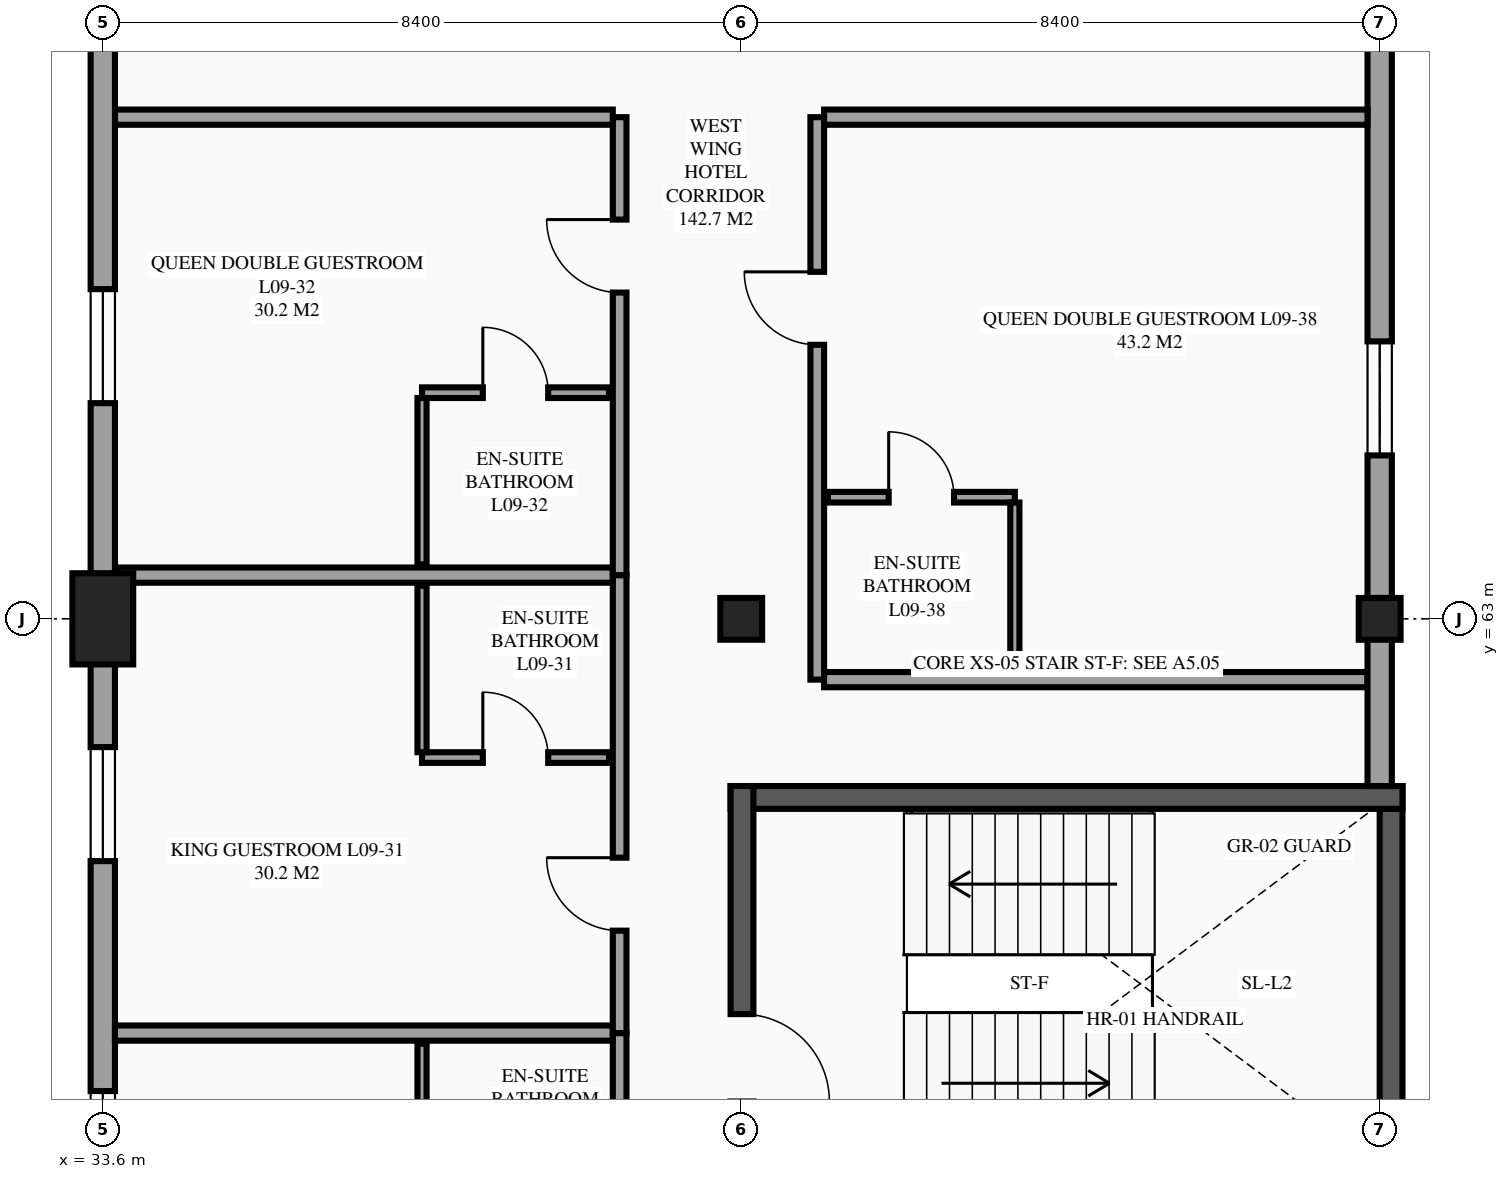
"""IFC4 building model, lengths in metres.
Left out: names, types, materials, properties, quantities, classifications, styles, units other than length and angle.
Written with IfcOpenShell. Run it as: python <this file> out.ifc"""

import sys

from ifc_helpers import new_model, si_unit, direction, frame, frame_2d, origin, origin_2d, place, context, subcontext, project, spatial, rectangle, extrude, element, fill, save


model = new_model("IFC4")
c1 = context("Model", 3, precision=1e-05, world=origin(), true_north=direction((0.0, 1.0)))
c2 = subcontext(c1, "Body", "Model", "MODEL_VIEW")
j1 = project(units=[si_unit("LENGTHUNIT", "METRE"), si_unit("PLANEANGLEUNIT", "RADIAN")], contexts=[c1])
p1 = place(None, origin())
s1 = spatial("IfcSite", under=j1, at=p1, CompositionType="ELEMENT")
p2 = place(p1, origin())
s2 = spatial("IfcBuilding", under=s1, at=p2, CompositionType="ELEMENT")
p3 = place(p2, frame((0.0, 0.0, 36.3)))
s3 = spatial("IfcBuildingStorey", under=s2, at=p3, CompositionType="ELEMENT", Elevation=36.3)
p4 = place(p3, frame((33.6, 63.0, 0.0), z_axis=(0.0, 0.0, 1.0), x_axis=(1.0, 0.0, 0.0)))
e1 = element("IfcColumn", 1, at=p4, inside=s3, PredefinedType="COLUMN", context=c2, shape_type="SweptSolid", body=[
    extrude(rectangle(XDim=0.8, YDim=1.2, at=origin_2d()), origin(), (0.0, 0.0, 1.0), 3.6),
])
for number, where, z_axis, x_axis in (
    (2, (42.0, 63.0, 0.0), (0.0, 0.0, 1.0), (1.0, 0.0, 0.0)),
    (3, (50.4, 63.0, 0.0), (0.0, 0.0, 1.0), (1.0, 0.0, 0.0)),
):
    element("IfcColumn", number, at=place(p3, frame(where, z_axis=z_axis, x_axis=x_axis)), inside=s3, PredefinedType="COLUMN", context=c2, shape_type="SweptSolid", body=[
        extrude(rectangle(XDim=0.55, YDim=0.55, at=origin_2d()), origin(), (0.0, 0.0, 1.0), 3.6),
    ])
p5 = place(p3, frame((50.4, 63.0, 0.0), z_axis=(0.0, 0.0, 1.0), x_axis=(0.0, 1.0, 0.0)))
e4 = element("IfcWall", 4, at=p5, inside=s3, PredefinedType="STANDARD", context=c2, shape_type="SweptSolid", body=[
    extrude(rectangle(XDim=8.4, YDim=0.32, at=frame_2d((4.2, 0.0))), origin(), (0.0, 0.0, 1.0), 3.126),
])
p6 = place(p5, frame((2.15, 0.0, 0.85)))
e5 = element("IfcOpeningElement", 5, at=p6, cuts=e4, PredefinedType="OPENING", context=c2, shape_type="SweptSolid", body=[
    extrude(rectangle(XDim=1.5, YDim=1.5, at=frame_2d((0.75, 0.75))), frame((0.0, 0.17, 0.0), z_axis=(0.0, -1.0, 0.0), x_axis=(1.0, 0.0, 0.0)), (0.0, 0.0, 1.0), 0.34),
])
p7 = place(p3, frame((33.6, 63.0, 0.0), z_axis=(0.0, 0.0, 1.0), x_axis=(0.0, -1.0, 0.0)))
e6 = element("IfcWall", 6, at=p7, inside=s3, PredefinedType="STANDARD", context=c2, shape_type="SweptSolid", body=[
    extrude(rectangle(XDim=25.2, YDim=0.32, at=frame_2d((12.6, 0.0))), origin(), (0.0, 0.0, 1.0), 2.63),
])
p8 = place(p7, frame((19.762, 0.0, 0.85)))
e7 = element("IfcOpeningElement", 7, at=p8, cuts=e6, PredefinedType="OPENING", context=c2, shape_type="SweptSolid", body=[
    extrude(rectangle(XDim=1.5, YDim=1.5, at=frame_2d((0.75, 0.75))), frame((0.0, 0.17, 0.0), z_axis=(0.0, -1.0, 0.0), x_axis=(1.0, 0.0, 0.0)), (0.0, 0.0, 1.0), 0.34),
])
p9 = place(p7, frame((13.738, 0.0, 0.85)))
e8 = element("IfcOpeningElement", 8, at=p9, cuts=e6, PredefinedType="OPENING", context=c2, shape_type="SweptSolid", body=[
    extrude(rectangle(XDim=1.5, YDim=1.5, at=frame_2d((0.75, 0.75))), frame((0.0, 0.17, 0.0), z_axis=(0.0, -1.0, 0.0), x_axis=(1.0, 0.0, 0.0)), (0.0, 0.0, 1.0), 0.34),
])
p10 = place(p7, frame((6.212, 0.0, 0.85)))
e9 = element("IfcOpeningElement", 9, at=p10, cuts=e6, PredefinedType="OPENING", context=c2, shape_type="SweptSolid", body=[
    extrude(rectangle(XDim=1.5, YDim=1.5, at=frame_2d((0.75, 0.75))), frame((0.0, 0.17, 0.0), z_axis=(0.0, -1.0, 0.0), x_axis=(1.0, 0.0, 0.0)), (0.0, 0.0, 1.0), 0.34),
])
p11 = place(p7, frame((1.688, 0.0, 0.85)))
e10 = element("IfcOpeningElement", 10, at=p11, cuts=e6, PredefinedType="OPENING", context=c2, shape_type="SweptSolid", body=[
    extrude(rectangle(XDim=1.5, YDim=1.5, at=frame_2d((0.75, 0.75))), frame((0.0, 0.17, 0.0), z_axis=(0.0, -1.0, 0.0), x_axis=(1.0, 0.0, 0.0)), (0.0, 0.0, 1.0), 0.34),
])
p12 = place(p3, frame((50.55, 55.6, 0.0), z_axis=(0.0, 0.0, 1.0), x_axis=(0.0, 1.0, 0.0)))
e11 = element("IfcWall", 11, at=p12, inside=s3, PredefinedType="SHEAR", context=c2, shape_type="SweptSolid", body=[
    extrude(rectangle(XDim=5.2, YDim=0.3, at=frame_2d((2.6, 0.0))), origin(), (0.0, 0.0, 1.0), 3.6),
])
p13 = place(p3, frame((50.7, 60.65, 0.0), z_axis=(0.0, 0.0, 1.0), x_axis=(-1.0, 0.0, 0.0)))
e12 = element("IfcWall", 12, at=p13, inside=s3, PredefinedType="SHEAR", context=c2, shape_type="SweptSolid", body=[
    extrude(rectangle(XDim=8.84, YDim=0.3, at=frame_2d((4.42, 0.0))), origin(), (0.0, 0.0, 1.0), 3.6),
])
p14 = place(p3, frame((42.01, 60.8, 0.0), z_axis=(0.0, 0.0, 1.0), x_axis=(0.0, -1.0, 0.0)))
e13 = element("IfcWall", 13, at=p14, inside=s3, PredefinedType="SHEAR", context=c2, shape_type="SweptSolid", body=[
    extrude(rectangle(XDim=5.2, YDim=0.3, at=frame_2d((2.6, 0.0))), origin(), (0.0, 0.0, 1.0), 3.6),
])
p15 = place(p14, frame((3.0, 0.0, 0.0)))
e14 = element("IfcOpeningElement", 14, at=p15, cuts=e13, PredefinedType="OPENING", context=c2, shape_type="SweptSolid", body=[
    extrude(rectangle(XDim=1.15, YDim=2.15, at=frame_2d((0.575, 1.075))), frame((0.0, 0.16, 0.0), z_axis=(0.0, -1.0, 0.0), x_axis=(1.0, 0.0, 0.0)), (0.0, 0.0, 1.0), 0.32),
])
p16 = place(p3, frame((40.4, 51.525, 0.0), z_axis=(0.0, 0.0, 1.0), x_axis=(0.0, 1.0, 0.0)))
e15 = element("IfcWall", 15, at=p16, inside=s3, PredefinedType="PARTITIONING", context=c2, shape_type="SweptSolid", body=[
    extrude(rectangle(XDim=6.025, YDim=0.18, at=frame_2d((3.013, 0.0))), origin(), (0.0, 0.0, 1.0), 3.375),
])
p17 = place(p16, frame((0.647, 0.0, 0.0)))
e16 = element("IfcOpeningElement", 16, at=p17, cuts=e15, PredefinedType="OPENING", context=c2, shape_type="SweptSolid", body=[
    extrude(rectangle(XDim=0.96, YDim=2.15, at=frame_2d((0.48, 1.075))), frame((0.0, 0.1, 0.0), z_axis=(0.0, -1.0, 0.0), x_axis=(1.0, 0.0, 0.0)), (0.0, 0.0, 1.0), 0.2),
])
p18 = place(p3, frame((33.76, 57.55, 0.0), z_axis=(0.0, 0.0, 1.0), x_axis=(1.0, 0.0, 0.0)))
e17 = element("IfcWall", 17, at=p18, inside=s3, PredefinedType="PARTITIONING", context=c2, shape_type="SweptSolid", body=[
    extrude(rectangle(XDim=6.55, YDim=0.2, at=frame_2d((3.275, 0.0))), origin(), (0.0, 0.0, 1.0), 3.375),
])
p19 = place(p3, frame((37.8, 55.22, 0.0), z_axis=(0.0, 0.0, 1.0), x_axis=(0.0, 1.0, 0.0)))
e18 = element("IfcWall", 18, at=p19, inside=s3, PredefinedType="PARTITIONING", context=c2, shape_type="SweptSolid", body=[
    extrude(rectangle(XDim=2.19, YDim=0.12, at=frame_2d((1.095, 0.0))), origin(), (0.0, 0.0, 1.0), 3.375),
])
p20 = place(p3, frame((40.4, 57.55, 0.0), z_axis=(0.0, 0.0, 1.0), x_axis=(0.0, 1.0, 0.0)))
e19 = element("IfcWall", 19, at=p20, inside=s3, PredefinedType="PARTITIONING", context=c2, shape_type="SweptSolid", body=[
    extrude(rectangle(XDim=6.025, YDim=0.18, at=frame_2d((3.012, 0.0))), origin(), (0.0, 0.0, 1.0), 3.375),
])
p21 = place(p20, frame((1.347, 0.0, 0.0)))
e20 = element("IfcOpeningElement", 20, at=p21, cuts=e19, PredefinedType="OPENING", context=c2, shape_type="SweptSolid", body=[
    extrude(rectangle(XDim=0.96, YDim=2.15, at=frame_2d((0.48, 1.075))), frame((0.0, 0.1, 0.0), z_axis=(0.0, -1.0, 0.0), x_axis=(1.0, 0.0, 0.0)), (0.0, 0.0, 1.0), 0.2),
])
p22 = place(p3, frame((33.76, 63.575, 0.0), z_axis=(0.0, 0.0, 1.0), x_axis=(1.0, 0.0, 0.0)))
e21 = element("IfcWall", 21, at=p22, inside=s3, PredefinedType="PARTITIONING", context=c2, shape_type="SweptSolid", body=[
    extrude(rectangle(XDim=6.55, YDim=0.2, at=frame_2d((3.275, 0.0))), origin(), (0.0, 0.0, 1.0), 3.375),
])
p23 = place(p3, frame((37.8, 61.175, 0.0), z_axis=(0.0, 0.0, 1.0), x_axis=(1.0, 0.0, 0.0)))
e22 = element("IfcWall", 22, at=p23, inside=s3, PredefinedType="PARTITIONING", context=c2, shape_type="SweptSolid", body=[
    extrude(rectangle(XDim=2.46, YDim=0.14, at=frame_2d((1.23, 0.0))), origin(), (0.0, 0.0, 1.0), 3.375),
])
p24 = place(p23, frame((0.8, 0.0, 0.0)))
e23 = element("IfcOpeningElement", 23, at=p24, cuts=e22, PredefinedType="OPENING", context=c2, shape_type="SweptSolid", body=[
    extrude(rectangle(XDim=0.86, YDim=2.1, at=frame_2d((0.43, 1.05))), frame((0.0, 0.08, 0.0), z_axis=(0.0, -1.0, 0.0), x_axis=(1.0, 0.0, 0.0)), (0.0, 0.0, 1.0), 0.16),
])
p25 = place(p3, frame((37.8, 61.245, 0.0), z_axis=(0.0, 0.0, 1.0), x_axis=(0.0, 1.0, 0.0)))
e24 = element("IfcWall", 24, at=p25, inside=s3, PredefinedType="PARTITIONING", context=c2, shape_type="SweptSolid", body=[
    extrude(rectangle(XDim=2.19, YDim=0.12, at=frame_2d((1.095, 0.0))), origin(), (0.0, 0.0, 1.0), 3.375),
])
p26 = place(p3, frame((40.4, 63.575, 0.0), z_axis=(0.0, 0.0, 1.0), x_axis=(0.0, 1.0, 0.0)))
e25 = element("IfcWall", 25, at=p26, inside=s3, PredefinedType="PARTITIONING", context=c2, shape_type="SweptSolid", body=[
    extrude(rectangle(XDim=6.025, YDim=0.18, at=frame_2d((3.013, 0.0))), origin(), (0.0, 0.0, 1.0), 3.375),
])
p27 = place(p26, frame((3.718, 0.0, 0.0)))
e26 = element("IfcOpeningElement", 26, at=p27, cuts=e25, PredefinedType="OPENING", context=c2, shape_type="SweptSolid", body=[
    extrude(rectangle(XDim=0.96, YDim=2.15, at=frame_2d((0.48, 1.075))), frame((0.0, 0.1, 0.0), z_axis=(0.0, -1.0, 0.0), x_axis=(1.0, 0.0, 0.0)), (0.0, 0.0, 1.0), 0.2),
])
p28 = place(p3, frame((33.76, 69.6, 0.0), z_axis=(0.0, 0.0, 1.0), x_axis=(1.0, 0.0, 0.0)))
e27 = element("IfcWall", 27, at=p28, inside=s3, PredefinedType="PARTITIONING", context=c2, shape_type="SweptSolid", body=[
    extrude(rectangle(XDim=6.55, YDim=0.2, at=frame_2d((3.275, 0.0))), origin(), (0.0, 0.0, 1.0), 3.375),
])
p29 = place(p3, frame((37.8, 65.975, 0.0), z_axis=(0.0, 0.0, 1.0), x_axis=(1.0, 0.0, 0.0)))
e28 = element("IfcWall", 28, at=p29, inside=s3, PredefinedType="PARTITIONING", context=c2, shape_type="SweptSolid", body=[
    extrude(rectangle(XDim=2.46, YDim=0.14, at=frame_2d((1.23, 0.0))), origin(), (0.0, 0.0, 1.0), 3.375),
])
p30 = place(p29, frame((0.8, 0.0, 0.0)))
e29 = element("IfcOpeningElement", 29, at=p30, cuts=e28, PredefinedType="OPENING", context=c2, shape_type="SweptSolid", body=[
    extrude(rectangle(XDim=0.86, YDim=2.1, at=frame_2d((0.43, 1.05))), frame((0.0, 0.08, 0.0), z_axis=(0.0, -1.0, 0.0), x_axis=(1.0, 0.0, 0.0)), (0.0, 0.0, 1.0), 0.16),
])
p31 = place(p3, frame((37.8, 63.715, 0.0), z_axis=(0.0, 0.0, 1.0), x_axis=(0.0, 1.0, 0.0)))
e30 = element("IfcWall", 30, at=p31, inside=s3, PredefinedType="PARTITIONING", context=c2, shape_type="SweptSolid", body=[
    extrude(rectangle(XDim=2.19, YDim=0.12, at=frame_2d((1.095, 0.0))), origin(), (0.0, 0.0, 1.0), 3.375),
])
p32 = place(p3, frame((43.0, 62.2, 0.0), z_axis=(0.0, 0.0, 1.0), x_axis=(0.0, 1.0, 0.0)))
e31 = element("IfcWall", 31, at=p32, inside=s3, PredefinedType="PARTITIONING", context=c2, shape_type="SweptSolid", body=[
    extrude(rectangle(XDim=7.4, YDim=0.18, at=frame_2d((3.7, 0.0))), origin(), (0.0, 0.0, 1.0), 3.375),
])
p33 = place(p32, frame((4.405, 0.0, 0.0)))
e32 = element("IfcOpeningElement", 32, at=p33, cuts=e31, PredefinedType="OPENING", context=c2, shape_type="SweptSolid", body=[
    extrude(rectangle(XDim=0.96, YDim=2.15, at=frame_2d((0.48, 1.075))), frame((0.0, 0.1, 0.0), z_axis=(0.0, -1.0, 0.0), x_axis=(1.0, 0.0, 0.0)), (0.0, 0.0, 1.0), 0.2),
])
for number, where, z_axis, x_axis in (
    (33, (43.09, 62.2, 0.0), (0.0, 0.0, 1.0), (1.0, 0.0, 0.0)),
    (34, (43.09, 69.6, 0.0), (0.0, 0.0, 1.0), (1.0, 0.0, 0.0)),
):
    element("IfcWall", number, at=place(p3, frame(where, z_axis=z_axis, x_axis=x_axis)), inside=s3, PredefinedType="PARTITIONING", context=c2, shape_type="SweptSolid", body=[
        extrude(rectangle(XDim=7.15, YDim=0.2, at=frame_2d((3.575, 0.0))), origin(), (0.0, 0.0, 1.0), 3.375),
    ])
p34 = place(p3, frame((43.14, 64.6, 0.0), z_axis=(0.0, 0.0, 1.0), x_axis=(1.0, 0.0, 0.0)))
e35 = element("IfcWall", 35, at=p34, inside=s3, PredefinedType="PARTITIONING", context=c2, shape_type="SweptSolid", body=[
    extrude(rectangle(XDim=2.46, YDim=0.14, at=frame_2d((1.23, 0.0))), origin(), (0.0, 0.0, 1.0), 3.375),
])
p35 = place(p34, frame((0.8, 0.0, 0.0)))
e36 = element("IfcOpeningElement", 36, at=p35, cuts=e35, PredefinedType="OPENING", context=c2, shape_type="SweptSolid", body=[
    extrude(rectangle(XDim=0.86, YDim=2.1, at=frame_2d((0.43, 1.05))), frame((0.0, 0.08, 0.0), z_axis=(0.0, -1.0, 0.0), x_axis=(1.0, 0.0, 0.0)), (0.0, 0.0, 1.0), 0.16),
])
p36 = place(p3, frame((45.6, 62.34, 0.0), z_axis=(0.0, 0.0, 1.0), x_axis=(0.0, 1.0, 0.0)))
e37 = element("IfcWall", 37, at=p36, inside=s3, PredefinedType="PARTITIONING", context=c2, shape_type="SweptSolid", body=[
    extrude(rectangle(XDim=2.19, YDim=0.12, at=frame_2d((1.095, 0.0))), origin(), (0.0, 0.0, 1.0), 3.375),
])
p37 = place(p3, frame((50.4, 60.8, 0.0), z_axis=(0.0, 0.0, 1.0), x_axis=(0.0, 1.0, 0.0)))
e38 = element("IfcWall", 38, at=p37, inside=s3, PredefinedType="STANDARD", context=c2, shape_type="SweptSolid", body=[
    extrude(rectangle(XDim=2.2, YDim=0.32, at=frame_2d((1.1, 0.0))), origin(), (0.0, 0.0, 1.0), 2.58),
])
p38 = place(p3, frame((33.6, 71.4, 0.0), z_axis=(0.0, 0.0, 1.0), x_axis=(0.0, -1.0, 0.0)))
e39 = element("IfcWall", 39, at=p38, inside=s3, PredefinedType="STANDARD", context=c2, shape_type="SweptSolid", body=[
    extrude(rectangle(XDim=8.4, YDim=0.32, at=frame_2d((4.2, 0.0))), origin(), (0.0, 0.0, 1.0), 3.075),
])
p39 = place(p38, frame((4.062, 0.0, 0.85)))
e40 = element("IfcOpeningElement", 40, at=p39, cuts=e39, PredefinedType="OPENING", context=c2, shape_type="SweptSolid", body=[
    extrude(rectangle(XDim=1.5, YDim=1.5, at=frame_2d((0.75, 0.75))), frame((0.0, 0.17, 0.0), z_axis=(0.0, -1.0, 0.0), x_axis=(1.0, 0.0, 0.0)), (0.0, 0.0, 1.0), 0.34),
])
p40 = place(p10, origin())
e41 = element("IfcWindow", 41, at=p40, inside=s3, PartitioningType="SINGLE_PANEL", PredefinedType="WINDOW", context=c2, shape_type="SweptSolid", body=[
    extrude(rectangle(XDim=1.5, YDim=1.5, at=frame_2d((0.75, 0.75))), frame((0.0, 0.03, 0.0), z_axis=(0.0, -1.0, 0.0), x_axis=(1.0, 0.0, 0.0)), (0.0, 0.0, 1.0), 0.06),
])
fill(e9, e41)
p41 = place(p11, origin())
e42 = element("IfcWindow", 42, at=p41, inside=s3, PartitioningType="SINGLE_PANEL", PredefinedType="WINDOW", context=c2, shape_type="SweptSolid", body=[
    extrude(rectangle(XDim=1.5, YDim=1.5, at=frame_2d((0.75, 0.75))), frame((0.0, 0.03, 0.0), z_axis=(0.0, -1.0, 0.0), x_axis=(1.0, 0.0, 0.0)), (0.0, 0.0, 1.0), 0.06),
])
fill(e10, e42)
p42 = place(p39, origin())
e43 = element("IfcWindow", 43, at=p42, inside=s3, PartitioningType="SINGLE_PANEL", PredefinedType="WINDOW", context=c2, shape_type="SweptSolid", body=[
    extrude(rectangle(XDim=1.5, YDim=1.5, at=frame_2d((0.75, 0.75))), frame((0.0, 0.03, 0.0), z_axis=(0.0, -1.0, 0.0), x_axis=(1.0, 0.0, 0.0)), (0.0, 0.0, 1.0), 0.06),
])
fill(e40, e43)
p43 = place(p6, origin())
e44 = element("IfcWindow", 44, at=p43, inside=s3, PartitioningType="SINGLE_PANEL", PredefinedType="WINDOW", context=c2, shape_type="SweptSolid", body=[
    extrude(rectangle(XDim=1.5, YDim=1.5, at=frame_2d((0.75, 0.75))), frame((0.0, 0.03, 0.0), z_axis=(0.0, -1.0, 0.0), x_axis=(1.0, 0.0, 0.0)), (0.0, 0.0, 1.0), 0.06),
])
fill(e5, e44)
p44 = place(p15, origin())
e45 = element("IfcDoor", 45, at=p44, inside=s3, OperationType="SINGLE_SWING_RIGHT", PredefinedType="DOOR", context=c2, shape_type="SweptSolid", body=[
    extrude(rectangle(XDim=1.15, YDim=2.15, at=frame_2d((0.575, 1.075))), frame((0.0, 0.025, 0.0), z_axis=(0.0, -1.0, 0.0), x_axis=(1.0, 0.0, 0.0)), (0.0, 0.0, 1.0), 0.05),
])
fill(e14, e45)
p45 = place(p21, origin())
e46 = element("IfcDoor", 46, at=p45, inside=s3, OperationType="SINGLE_SWING_RIGHT", PredefinedType="DOOR", context=c2, shape_type="SweptSolid", body=[
    extrude(rectangle(XDim=0.96, YDim=2.15, at=frame_2d((0.48, 1.075))), frame((0.0, 0.025, 0.0), z_axis=(0.0, -1.0, 0.0), x_axis=(1.0, 0.0, 0.0)), (0.0, 0.0, 1.0), 0.05),
])
fill(e20, e46)
p46 = place(p24, origin())
e47 = element("IfcDoor", 47, at=p46, inside=s3, OperationType="SINGLE_SWING_LEFT", PredefinedType="DOOR", context=c2, shape_type="SweptSolid", body=[
    extrude(rectangle(XDim=0.86, YDim=2.1, at=frame_2d((0.43, 1.05))), frame((0.0, 0.025, 0.0), z_axis=(0.0, -1.0, 0.0), x_axis=(1.0, 0.0, 0.0)), (0.0, 0.0, 1.0), 0.05),
])
fill(e23, e47)
p47 = place(p27, origin())
e48 = element("IfcDoor", 48, at=p47, inside=s3, OperationType="SINGLE_SWING_RIGHT", PredefinedType="DOOR", context=c2, shape_type="SweptSolid", body=[
    extrude(rectangle(XDim=0.96, YDim=2.15, at=frame_2d((0.48, 1.075))), frame((0.0, 0.025, 0.0), z_axis=(0.0, -1.0, 0.0), x_axis=(1.0, 0.0, 0.0)), (0.0, 0.0, 1.0), 0.05),
])
fill(e26, e48)
p48 = place(p30, origin())
e49 = element("IfcDoor", 49, at=p48, inside=s3, OperationType="SINGLE_SWING_LEFT", PredefinedType="DOOR", context=c2, shape_type="SweptSolid", body=[
    extrude(rectangle(XDim=0.86, YDim=2.1, at=frame_2d((0.43, 1.05))), frame((0.0, 0.025, 0.0), z_axis=(0.0, -1.0, 0.0), x_axis=(1.0, 0.0, 0.0)), (0.0, 0.0, 1.0), 0.05),
])
fill(e29, e49)
p49 = place(p33, origin())
e50 = element("IfcDoor", 50, at=p49, inside=s3, OperationType="SINGLE_SWING_RIGHT", PredefinedType="DOOR", context=c2, shape_type="SweptSolid", body=[
    extrude(rectangle(XDim=0.96, YDim=2.15, at=frame_2d((0.48, 1.075))), frame((0.0, 0.025, 0.0), z_axis=(0.0, -1.0, 0.0), x_axis=(1.0, 0.0, 0.0)), (0.0, 0.0, 1.0), 0.05),
])
fill(e32, e50)
p50 = place(p35, origin())
e51 = element("IfcDoor", 51, at=p50, inside=s3, OperationType="SINGLE_SWING_LEFT", PredefinedType="DOOR", context=c2, shape_type="SweptSolid", body=[
    extrude(rectangle(XDim=0.86, YDim=2.1, at=frame_2d((0.43, 1.05))), frame((0.0, 0.025, 0.0), z_axis=(0.0, -1.0, 0.0), x_axis=(1.0, 0.0, 0.0)), (0.0, 0.0, 1.0), 0.05),
])
fill(e36, e51)
save(model, sys.argv[1])
